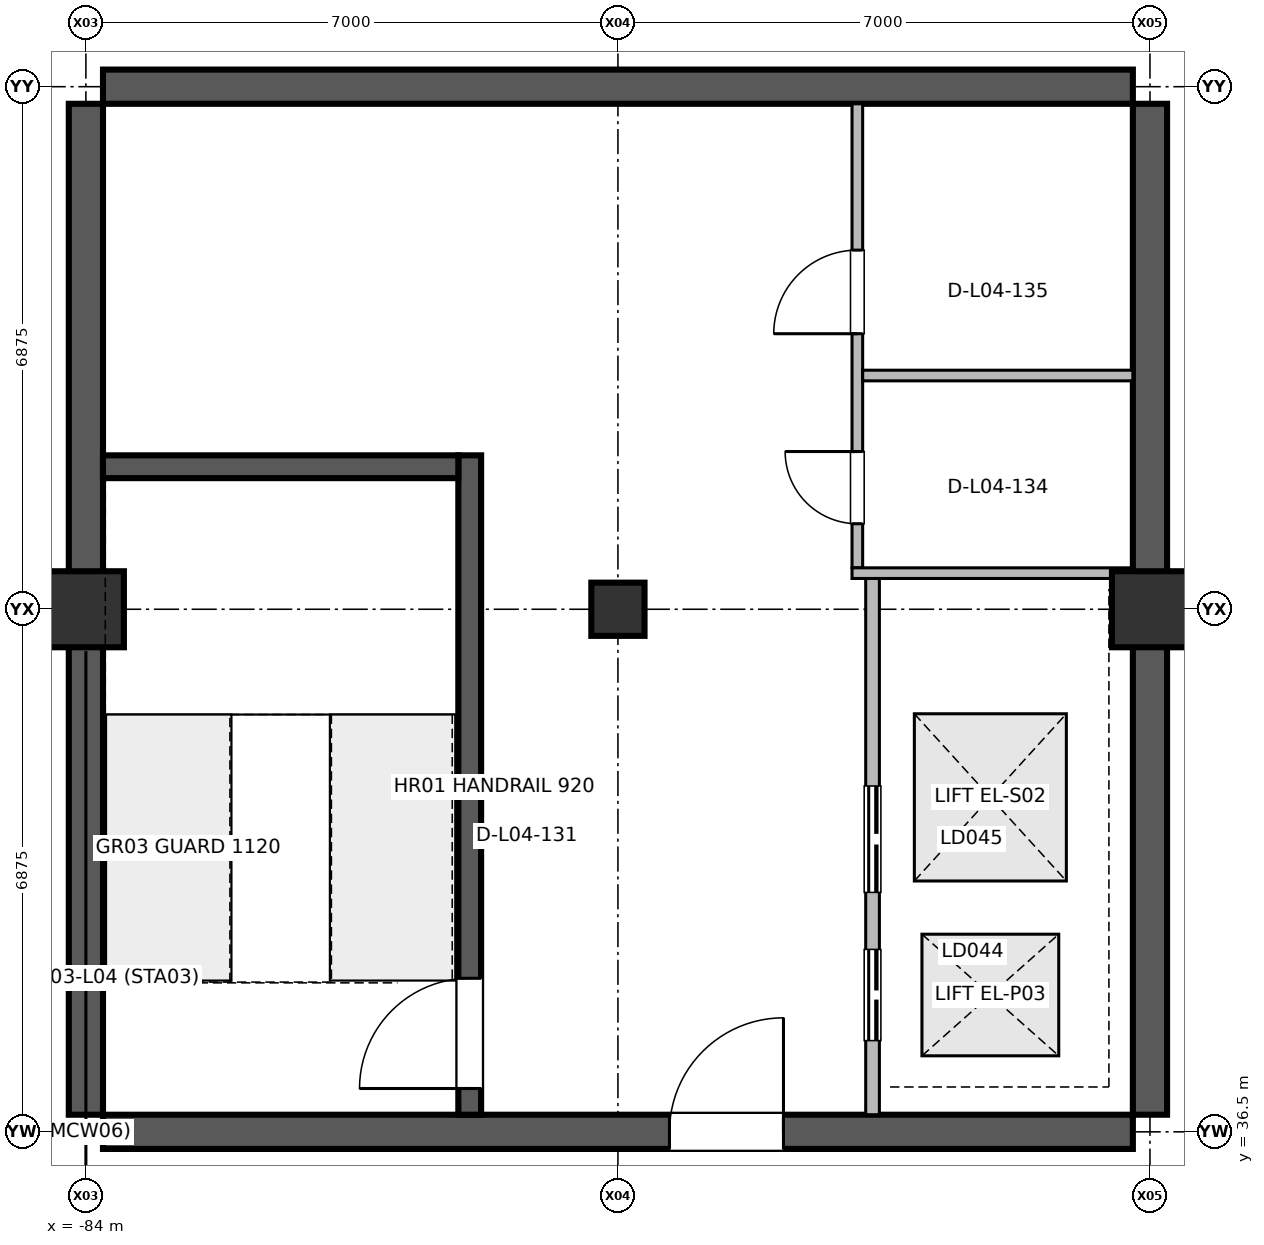
"""IFC4 building model, lengths in metres.
Left out: names, types, materials, properties, quantities, classifications, styles, units other than length and angle.
Written with IfcOpenShell. Run it as: python <this file> out.ifc"""

import sys

from ifc_helpers import new_model, si_unit, direction, frame, frame_2d, origin, origin_2d, place, context, subcontext, project, spatial, rectangle, extrude, element, fill, save


model = new_model("IFC4")
c1 = context("Model", 3, precision=1e-05, world=origin(), true_north=direction((0.0, 1.0)))
c2 = subcontext(c1, "Body", "Model", "MODEL_VIEW")
j1 = project(units=[si_unit("LENGTHUNIT", "METRE"), si_unit("PLANEANGLEUNIT", "RADIAN")], contexts=[c1])
p1 = place(None, origin())
s1 = spatial("IfcSite", under=j1, at=p1, CompositionType="ELEMENT")
p2 = place(p1, origin())
s2 = spatial("IfcBuilding", under=s1, at=p2, CompositionType="ELEMENT")
p3 = place(p2, frame((0.0, 0.0, 16.2)))
s3 = spatial("IfcBuildingStorey", under=s2, at=p3, CompositionType="ELEMENT", Elevation=16.2)
p4 = place(p3, frame((-84.0, 43.375, 0.0), z_axis=(0.0, 0.0, 1.0), x_axis=(1.0, 0.0, 0.0)))
e1 = element("IfcColumn", 1, at=p4, inside=s3, PredefinedType="COLUMN", context=c2, shape_type="SweptSolid", body=[
    extrude(rectangle(XDim=1.0, YDim=1.0, at=origin_2d()), origin(), (0.0, 0.0, 1.0), 4.798),
])
p5 = place(p3, frame((-77.0, 43.375, 0.0), z_axis=(0.0, 0.0, 1.0), x_axis=(1.0, 0.0, 0.0)))
e2 = element("IfcColumn", 2, at=p5, inside=s3, PredefinedType="COLUMN", context=c2, shape_type="SweptSolid", body=[
    extrude(rectangle(XDim=0.7, YDim=0.7, at=origin_2d()), origin(), (0.0, 0.0, 1.0), 4.6),
])
p6 = place(p3, frame((-70.0, 43.375, 0.0), z_axis=(0.0, 0.0, 1.0), x_axis=(1.0, 0.0, 0.0)))
e3 = element("IfcColumn", 3, at=p6, inside=s3, PredefinedType="COLUMN", context=c2, shape_type="SweptSolid", body=[
    extrude(rectangle(XDim=1.0, YDim=1.0, at=origin_2d()), origin(), (0.0, 0.0, 1.0), 4.798),
])
for number, where, z_axis, x_axis in (
    (4, (-84.0, 36.725, 0.0), (0.0, 0.0, 1.0), (0.0, 1.0, 0.0)),
    (5, (-70.0, 36.725, 0.0), (0.0, 0.0, 1.0), (0.0, 1.0, 0.0)),
):
    element("IfcWall", number, at=place(p3, frame(where, z_axis=z_axis, x_axis=x_axis)), inside=s3, PredefinedType="SHEAR", context=c2, shape_type="SweptSolid", body=[
        extrude(rectangle(XDim=13.3, YDim=0.45, at=frame_2d((6.65, 0.0))), origin(), (0.0, 0.0, 1.0), 4.6),
    ])
p7 = place(p3, frame((-83.775, 36.5, 0.0), z_axis=(0.0, 0.0, 1.0), x_axis=(1.0, 0.0, 0.0)))
e6 = element("IfcWall", 6, at=p7, inside=s3, PredefinedType="SHEAR", context=c2, shape_type="SweptSolid", body=[
    extrude(rectangle(XDim=13.55, YDim=0.45, at=frame_2d((6.775, 0.0))), origin(), (0.0, 0.0, 1.0), 4.6),
])
p8 = place(p7, frame((7.453, 0.0, 0.0)))
e7 = element("IfcOpeningElement", 7, at=p8, cuts=e6, PredefinedType="OPENING", context=c2, shape_type="SweptSolid", body=[
    extrude(rectangle(XDim=1.5, YDim=2.2, at=frame_2d((0.75, 1.1))), frame((0.0, 0.235, 0.0), z_axis=(0.0, -1.0, 0.0), x_axis=(1.0, 0.0, 0.0)), (0.0, 0.0, 1.0), 0.47),
])
p9 = place(p3, frame((-83.775, 50.25, 0.0), z_axis=(0.0, 0.0, 1.0), x_axis=(1.0, 0.0, 0.0)))
e8 = element("IfcWall", 8, at=p9, inside=s3, PredefinedType="SHEAR", context=c2, shape_type="SweptSolid", body=[
    extrude(rectangle(XDim=13.55, YDim=0.45, at=frame_2d((6.775, 0.0))), origin(), (0.0, 0.0, 1.0), 4.6),
])
p10 = place(p3, frame((-78.95, 36.725, 0.0), z_axis=(0.0, 0.0, 1.0), x_axis=(0.0, 1.0, 0.0)))
e9 = element("IfcWall", 9, at=p10, inside=s3, PredefinedType="SHEAR", context=c2, shape_type="SweptSolid", body=[
    extrude(rectangle(XDim=8.675, YDim=0.3, at=frame_2d((4.337, 0.0))), origin(), (0.0, 0.0, 1.0), 4.6),
])
p11 = place(p10, frame((0.345, 0.0, 0.0)))
e10 = element("IfcOpeningElement", 10, at=p11, cuts=e9, PredefinedType="OPENING", context=c2, shape_type="SweptSolid", body=[
    extrude(rectangle(XDim=1.45, YDim=2.2, at=frame_2d((0.725, 1.1))), frame((0.0, 0.16, 0.0), z_axis=(0.0, -1.0, 0.0), x_axis=(1.0, 0.0, 0.0)), (0.0, 0.0, 1.0), 0.32),
])
p12 = place(p3, frame((-73.65, 36.725, 0.0), z_axis=(0.0, 0.0, 1.0), x_axis=(0.0, 1.0, 0.0)))
e11 = element("IfcWall", 11, at=p12, inside=s3, PredefinedType="PARTITIONING", context=c2, shape_type="SweptSolid", body=[
    extrude(rectangle(XDim=7.055, YDim=0.18, at=frame_2d((3.527, 0.0))), origin(), (0.0, 0.0, 1.0), 3.82),
])
p13 = place(p12, frame((0.975, 0.0, 0.0)))
e12 = element("IfcOpeningElement", 12, at=p13, cuts=e11, PredefinedType="OPENING", context=c2, shape_type="SweptSolid", body=[
    extrude(rectangle(XDim=1.2, YDim=2.25, at=frame_2d((0.6, 1.125))), frame((0.0, 0.1, 0.0), z_axis=(0.0, -1.0, 0.0), x_axis=(1.0, 0.0, 0.0)), (0.0, 0.0, 1.0), 0.2),
])
p14 = place(p12, frame((2.925, 0.0, 0.0)))
e13 = element("IfcOpeningElement", 13, at=p14, cuts=e11, PredefinedType="OPENING", context=c2, shape_type="SweptSolid", body=[
    extrude(rectangle(XDim=1.4, YDim=2.3, at=frame_2d((0.7, 1.15))), frame((0.0, 0.1, 0.0), z_axis=(0.0, -1.0, 0.0), x_axis=(1.0, 0.0, 0.0)), (0.0, 0.0, 1.0), 0.2),
])
p15 = place(p3, frame((-73.85, 43.92, 0.0), z_axis=(0.0, 0.0, 1.0), x_axis=(0.0, 1.0, 0.0)))
e14 = element("IfcWall", 14, at=p15, inside=s3, PredefinedType="PARTITIONING", context=c2, shape_type="SweptSolid", body=[
    extrude(rectangle(XDim=6.105, YDim=0.14, at=frame_2d((3.052, 0.0))), origin(), (0.0, 0.0, 1.0), 3.82),
])
p16 = place(p15, frame((0.58, 0.0, 0.0)))
e15 = element("IfcOpeningElement", 15, at=p16, cuts=e14, PredefinedType="OPENING", context=c2, shape_type="SweptSolid", body=[
    extrude(rectangle(XDim=0.95, YDim=2.15, at=frame_2d((0.475, 1.075))), frame((0.0, 0.08, 0.0), z_axis=(0.0, -1.0, 0.0), x_axis=(1.0, 0.0, 0.0)), (0.0, 0.0, 1.0), 0.16),
])
p17 = place(p15, frame((3.08, 0.0, 0.0)))
e16 = element("IfcOpeningElement", 16, at=p17, cuts=e14, PredefinedType="OPENING", context=c2, shape_type="SweptSolid", body=[
    extrude(rectangle(XDim=1.1, YDim=2.15, at=frame_2d((0.55, 1.075))), frame((0.0, 0.08, 0.0), z_axis=(0.0, -1.0, 0.0), x_axis=(1.0, 0.0, 0.0)), (0.0, 0.0, 1.0), 0.16),
])
p18 = place(p3, frame((-73.92, 43.85, 0.0), z_axis=(0.0, 0.0, 1.0), x_axis=(1.0, 0.0, 0.0)))
e17 = element("IfcWall", 17, at=p18, inside=s3, PredefinedType="PARTITIONING", context=c2, shape_type="SweptSolid", body=[
    extrude(rectangle(XDim=3.695, YDim=0.14, at=frame_2d((1.847, 0.0))), origin(), (0.0, 0.0, 1.0), 3.82),
])
p19 = place(p3, frame((-73.78, 46.45, 0.0), z_axis=(0.0, 0.0, 1.0), x_axis=(1.0, 0.0, 0.0)))
e18 = element("IfcWall", 18, at=p19, inside=s3, PredefinedType="PARTITIONING", context=c2, shape_type="SweptSolid", body=[
    extrude(rectangle(XDim=3.555, YDim=0.14, at=frame_2d((1.777, 0.0))), origin(), (0.0, 0.0, 1.0), 3.82),
])
p20 = place(p3, frame((-83.775, 45.25, 0.0), z_axis=(0.0, 0.0, 1.0), x_axis=(1.0, 0.0, 0.0)))
e19 = element("IfcWall", 19, at=p20, inside=s3, PredefinedType="SHEAR", context=c2, shape_type="SweptSolid", body=[
    extrude(rectangle(XDim=4.675, YDim=0.3, at=frame_2d((2.337, 0.0))), origin(), (0.0, 0.0, 1.0), 4.6),
])
p21 = place(p8, origin())
e20 = element("IfcDoor", 20, at=p21, inside=s3, OperationType="SINGLE_SWING_RIGHT", PredefinedType="DOOR", context=c2, shape_type="SweptSolid", body=[
    extrude(rectangle(XDim=1.5, YDim=2.2, at=frame_2d((0.75, 1.1))), frame((0.0, 0.025, 0.0), z_axis=(0.0, -1.0, 0.0), x_axis=(1.0, 0.0, 0.0)), (0.0, 0.0, 1.0), 0.05),
])
fill(e7, e20)
p22 = place(p11, origin())
e21 = element("IfcDoor", 21, at=p22, inside=s3, OperationType="SINGLE_SWING_LEFT", PredefinedType="DOOR", context=c2, shape_type="SweptSolid", body=[
    extrude(rectangle(XDim=1.45, YDim=2.2, at=frame_2d((0.725, 1.1))), frame((0.0, 0.025, 0.0), z_axis=(0.0, -1.0, 0.0), x_axis=(1.0, 0.0, 0.0)), (0.0, 0.0, 1.0), 0.05),
])
fill(e10, e21)
p23 = place(p13, origin())
e22 = element("IfcDoor", 22, at=p23, inside=s3, OperationType="DOUBLE_DOOR_SLIDING", PredefinedType="DOOR", context=c2, shape_type="SweptSolid", body=[
    extrude(rectangle(XDim=1.2, YDim=2.25, at=frame_2d((0.6, 1.125))), frame((0.0, 0.025, 0.0), z_axis=(0.0, -1.0, 0.0), x_axis=(1.0, 0.0, 0.0)), (0.0, 0.0, 1.0), 0.05),
])
fill(e12, e22)
p24 = place(p14, origin())
e23 = element("IfcDoor", 23, at=p24, inside=s3, OperationType="DOUBLE_DOOR_SLIDING", PredefinedType="DOOR", context=c2, shape_type="SweptSolid", body=[
    extrude(rectangle(XDim=1.4, YDim=2.3, at=frame_2d((0.7, 1.15))), frame((0.0, 0.025, 0.0), z_axis=(0.0, -1.0, 0.0), x_axis=(1.0, 0.0, 0.0)), (0.0, 0.0, 1.0), 0.05),
])
fill(e13, e23)
p25 = place(p16, origin())
e24 = element("IfcDoor", 24, at=p25, inside=s3, OperationType="SINGLE_SWING_RIGHT", PredefinedType="DOOR", context=c2, shape_type="SweptSolid", body=[
    extrude(rectangle(XDim=0.95, YDim=2.15, at=frame_2d((0.475, 1.075))), frame((0.0, 0.025, 0.0), z_axis=(0.0, -1.0, 0.0), x_axis=(1.0, 0.0, 0.0)), (0.0, 0.0, 1.0), 0.05),
])
fill(e15, e24)
p26 = place(p17, origin())
e25 = element("IfcDoor", 25, at=p26, inside=s3, OperationType="SINGLE_SWING_LEFT", PredefinedType="DOOR", context=c2, shape_type="SweptSolid", body=[
    extrude(rectangle(XDim=1.1, YDim=2.15, at=frame_2d((0.55, 1.075))), frame((0.0, 0.025, 0.0), z_axis=(0.0, -1.0, 0.0), x_axis=(1.0, 0.0, 0.0)), (0.0, 0.0, 1.0), 0.05),
])
fill(e16, e25)
save(model, sys.argv[1])
